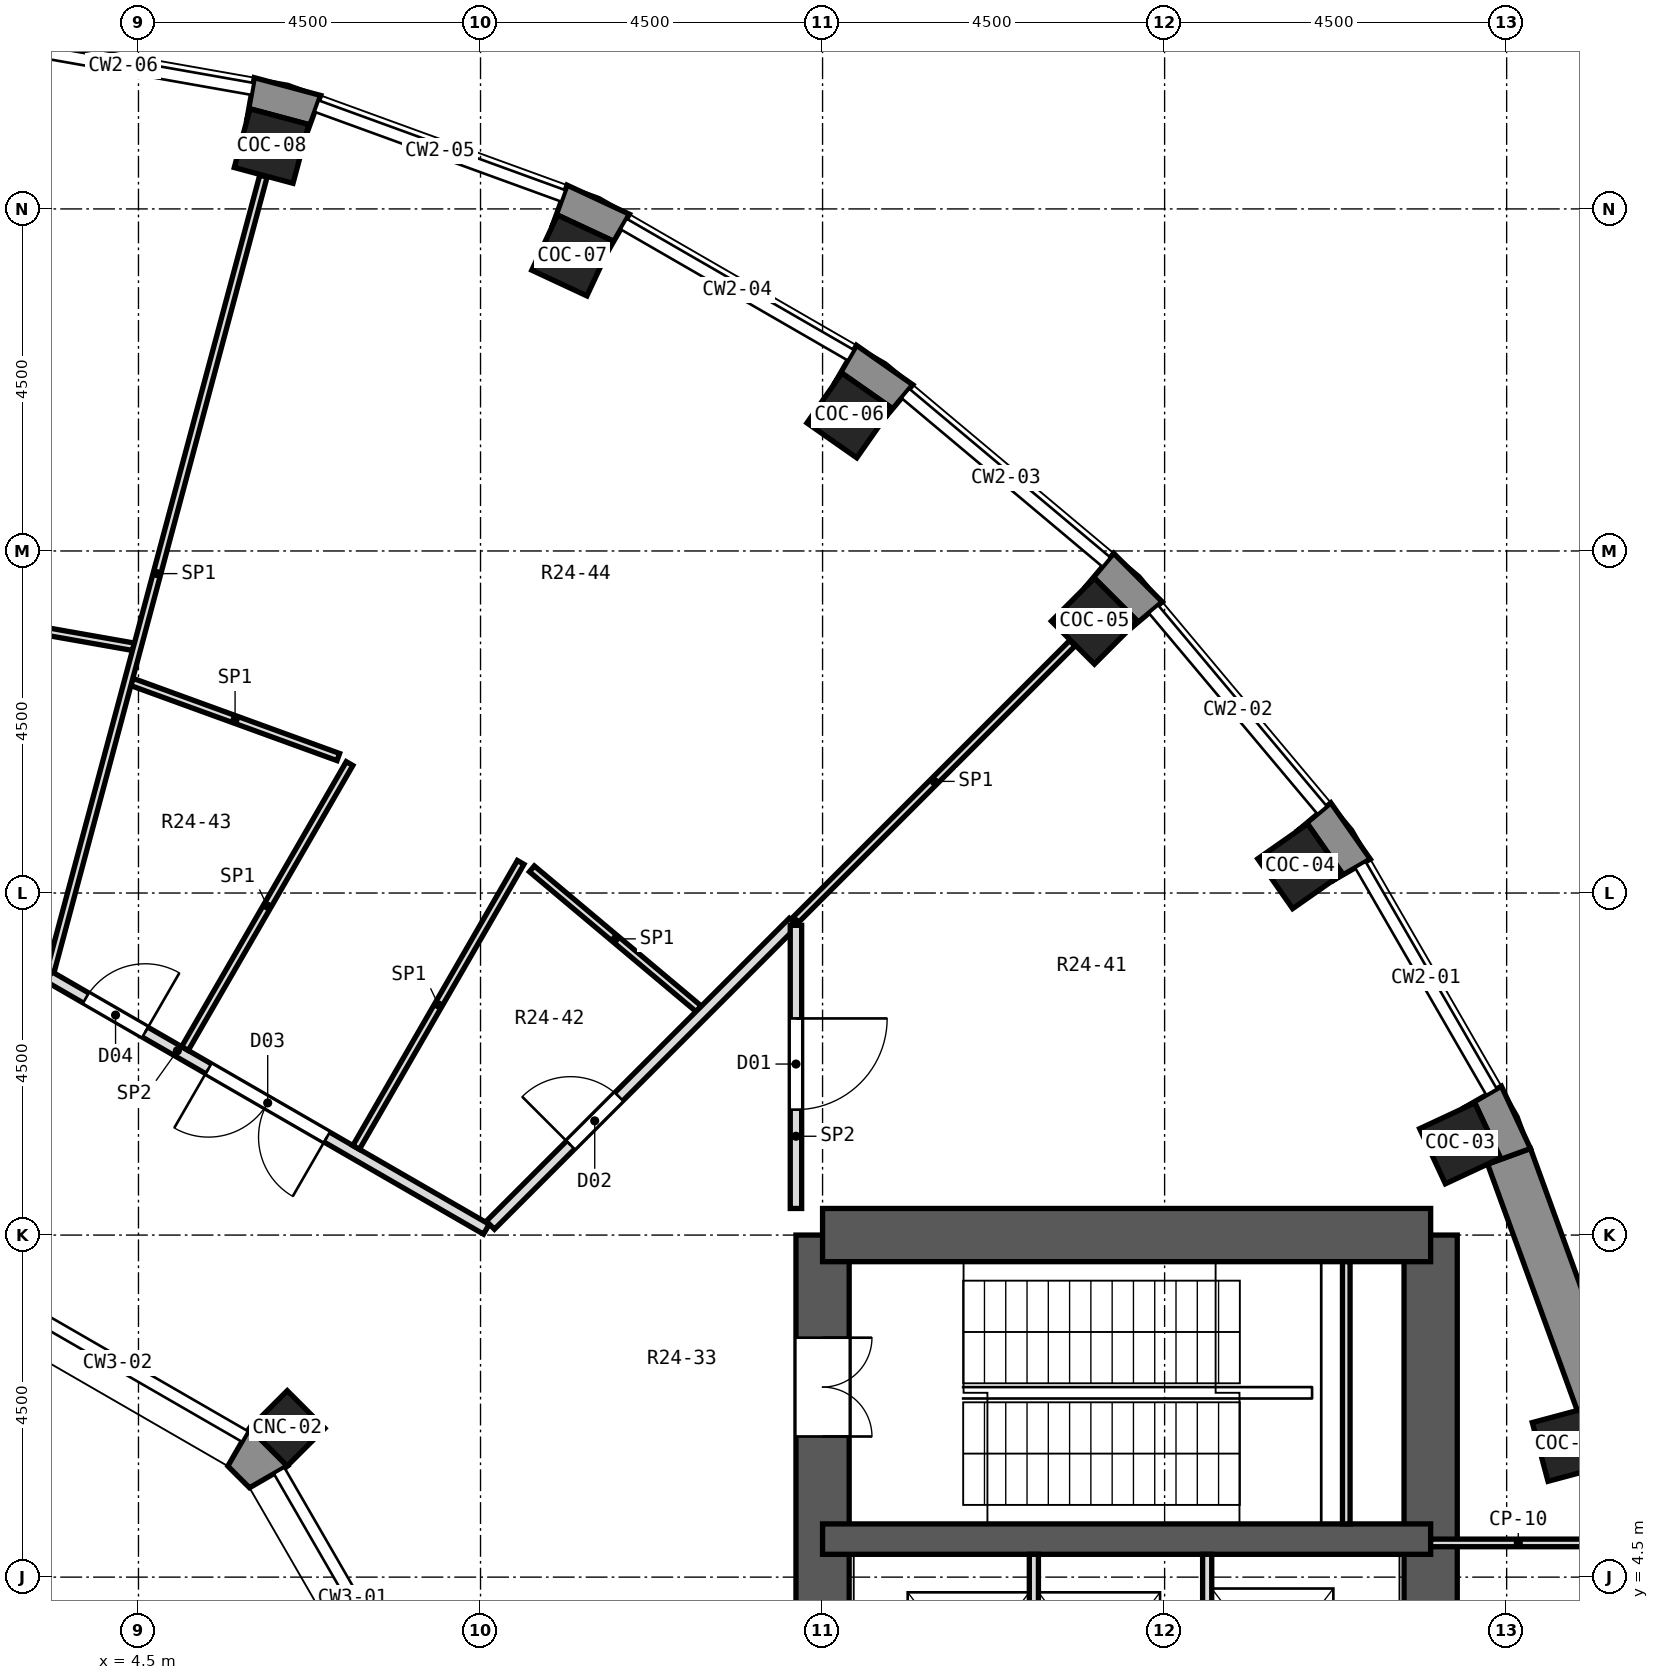
"""IFC4 building model, lengths in metres.
Left out: names, types, materials, properties, quantities, classifications, styles, units other than length and angle.
Written with IfcOpenShell. Run it as: python <this file> out.ifc"""

import sys

from ifc_helpers import new_model, si_unit, direction, frame, frame_2d, origin, origin_2d, place, context, subcontext, project, spatial, polyline, rectangle, outline, extrude, element, fill, save


model = new_model("IFC4")
c1 = context("Model", 3, precision=1e-05, world=origin(), true_north=direction((0.0, 1.0)))
c2 = subcontext(c1, "Body", "Model", "MODEL_VIEW")
j1 = project(units=[si_unit("LENGTHUNIT", "METRE"), si_unit("PLANEANGLEUNIT", "RADIAN")], contexts=[c1])
p1 = place(None, origin())
s1 = spatial("IfcSite", under=j1, at=p1, CompositionType="ELEMENT")
p2 = place(p1, origin())
s2 = spatial("IfcBuilding", under=s1, at=p2, CompositionType="ELEMENT")
p3 = place(p2, frame((0.0, 0.0, 155.8)))
s3 = spatial("IfcBuildingStorey", under=s2, at=p3, CompositionType="ELEMENT", Elevation=155.8)
for number, where, z_axis, x_axis in (
    (1, (23.327, 6.25, -0.55), (0.0, 0.0, 1.0), (0.966, 0.259, 0.0)),
    (2, (21.887, 10.206, -0.55), (0.0, 0.0, 1.0), (0.906, 0.423, 0.0)),
    (3, (19.782, 13.852, -0.55), (0.0, 0.0, 1.0), (0.819, 0.574, 0.0)),
    (4, (17.077, 17.077, -0.55), (0.0, 0.0, 1.0), (0.707, 0.707, 0.0)),
    (5, (13.852, 19.782, -0.55), (0.0, 0.0, 1.0), (0.574, 0.819, 0.0)),
    (6, (10.206, 21.887, -0.55), (0.0, 0.0, 1.0), (0.423, 0.906, 0.0)),
    (7, (6.25, 23.327, -0.55), (0.0, 0.0, 1.0), (0.259, 0.966, 0.0)),
):
    element("IfcColumn", number, at=place(p3, frame(where, z_axis=z_axis, x_axis=x_axis)), inside=s3, PredefinedType="COLUMN", context=c2, shape_type="SweptSolid", body=[
        extrude(rectangle(XDim=0.8, YDim=0.8, at=origin_2d()), origin(), (0.0, 0.0, 1.0), 5.55),
    ])
p4 = place(p3, frame((6.458, 6.458, 0.0), z_axis=(0.0, 0.0, 1.0), x_axis=(0.707106781187, 0.707106781187, 0.0)))
e8 = element("IfcColumn", 8, at=p4, inside=s3, PredefinedType="COLUMN", context=c2, shape_type="SweptSolid", body=[
    extrude(rectangle(XDim=0.7, YDim=0.7, at=origin_2d()), origin(), (0.0, 0.0, 1.0), 5.0),
])
p5 = place(p3, frame((13.5, -9.0, 0.0), z_axis=(0.0, 0.0, 1.0), x_axis=(0.0, 1.0, 0.0)))
e9 = element("IfcWall", 9, at=p5, inside=s3, PredefinedType="SHEAR", context=c2, shape_type="SweptSolid", body=[
    extrude(rectangle(XDim=18.0, YDim=0.7, at=frame_2d((9.0, 0.0))), origin(), (0.0, 0.0, 1.0), 5.0),
])
p6 = place(p5, frame((15.35, 0.0, 0.0)))
e10 = element("IfcOpeningElement", 10, at=p6, cuts=e9, PredefinedType="OPENING", context=c2, shape_type="SweptSolid", body=[
    extrude(rectangle(XDim=1.3, YDim=2.1, at=frame_2d((0.65, 1.05))), frame((0.0, 0.362, 0.0), z_axis=(0.0, -1.0, 0.0), x_axis=(1.0, 0.0, 0.0)), (0.0, 0.0, 1.0), 0.724),
])
p7 = place(p5, frame((1.35, 0.0, 0.0)))
e11 = element("IfcOpeningElement", 11, at=p7, cuts=e9, PredefinedType="OPENING", context=c2, shape_type="SweptSolid", body=[
    extrude(rectangle(XDim=1.3, YDim=2.1, at=frame_2d((0.65, 1.05))), frame((0.0, 0.362, 0.0), z_axis=(0.0, -1.0, 0.0), x_axis=(1.0, 0.0, 0.0)), (0.0, 0.0, 1.0), 0.724),
])
p8 = place(p5, frame((7.5, 0.0, 0.0)))
e12 = element("IfcOpeningElement", 12, at=p8, cuts=e9, PredefinedType="OPENING", context=c2, shape_type="SweptSolid", body=[
    extrude(rectangle(XDim=3.0, YDim=2.4, at=frame_2d((1.5, 1.2))), frame((0.0, 0.362, 0.0), z_axis=(0.0, -1.0, 0.0), x_axis=(1.0, 0.0, 0.0)), (0.0, 0.0, 1.0), 0.724),
])
p9 = place(p3, frame((21.5, -9.0, 0.0), z_axis=(0.0, 0.0, 1.0), x_axis=(0.0, 1.0, 0.0)))
e13 = element("IfcWall", 13, at=p9, inside=s3, PredefinedType="SHEAR", context=c2, shape_type="SweptSolid", body=[
    extrude(rectangle(XDim=18.0, YDim=0.7, at=frame_2d((9.0, 0.0))), origin(), (0.0, 0.0, 1.0), 5.0),
])
p10 = place(p9, frame((9.45, 0.0, 0.0)))
e14 = element("IfcOpeningElement", 14, at=p10, cuts=e13, PredefinedType="OPENING", context=c2, shape_type="SweptSolid", body=[
    extrude(rectangle(XDim=0.9, YDim=2.1, at=frame_2d((0.45, 1.05))), frame((0.0, 0.362, 0.0), z_axis=(0.0, -1.0, 0.0), x_axis=(1.0, 0.0, 0.0)), (0.0, 0.0, 1.0), 0.724),
])
p11 = place(p9, frame((7.65, 0.0, 0.0)))
e15 = element("IfcOpeningElement", 15, at=p11, cuts=e13, PredefinedType="OPENING", context=c2, shape_type="SweptSolid", body=[
    extrude(rectangle(XDim=0.9, YDim=2.1, at=frame_2d((0.45, 1.05))), frame((0.0, 0.362, 0.0), z_axis=(0.0, -1.0, 0.0), x_axis=(1.0, 0.0, 0.0)), (0.0, 0.0, 1.0), 0.724),
])
p12 = place(p3, frame((13.5, 9.0, 0.0), z_axis=(0.0, 0.0, 1.0), x_axis=(1.0, 0.0, 0.0)))
e16 = element("IfcWall", 16, at=p12, inside=s3, PredefinedType="SHEAR", context=c2, shape_type="SweptSolid", body=[
    extrude(rectangle(XDim=8.0, YDim=0.7, at=frame_2d((4.0, 0.0))), origin(), (0.0, 0.0, 1.0), 5.0),
])
p13 = place(p3, frame((13.5, 5.0, 0.0), z_axis=(0.0, 0.0, 1.0), x_axis=(1.0, 0.0, 0.0)))
e17 = element("IfcWall", 17, at=p13, inside=s3, PredefinedType="SHEAR", context=c2, shape_type="SweptSolid", body=[
    extrude(rectangle(XDim=8.0, YDim=0.4, at=frame_2d((4.0, 0.0))), origin(), (0.0, 0.0, 1.0), 5.0),
])
p14 = place(p3, frame((23.711, 6.794, 0.0), z_axis=(0.0, 0.0, 1.0), x_axis=(-0.342032843455, 0.93968799822, 0.0)))
e18 = element("IfcWall", 18, at=p14, inside=s3, PredefinedType="SOLIDWALL", context=c2, shape_type="SweptSolid", body=[
    extrude(rectangle(XDim=3.45, YDim=0.6, at=frame_2d((1.725, 0.0))), origin(), (0.0, 0.0, 1.0), 4.55),
])
p15 = place(p3, origin())
e19 = element("IfcWall", 19, at=p15, inside=s3, PredefinedType="SOLIDWALL", context=c2, shape_type="SweptSolid", body=[
    extrude(outline(polyline([(24.227, 6.023), (23.993, 6.897), (23.429, 6.692), (23.61, 6.74), (23.817, 5.968), (23.636, 5.919), (24.227, 6.023)])), origin(), (0.0, 0.0, 1.0), 4.55),
])
p16 = place(p3, origin())
e20 = element("IfcWall", 20, at=p16, inside=s3, PredefinedType="SOLIDWALL", context=c2, shape_type="SweptSolid", body=[
    extrude(outline(polyline([(22.431, 10.959), (21.911, 10.659), (22.081, 10.738), (22.419, 10.013), (22.249, 9.934), (22.813, 10.139), (22.431, 10.959)])), origin(), (0.0, 0.0, 1.0), 4.55),
])
p17 = place(p3, origin())
e21 = element("IfcWall", 21, at=p17, inside=s3, PredefinedType="SOLIDWALL", context=c2, shape_type="SweptSolid", body=[
    extrude(outline(polyline([(20.706, 13.946), (20.187, 14.687), (19.727, 14.302), (19.881, 14.409), (20.34, 13.754), (20.186, 13.646), (20.706, 13.946)])), origin(), (0.0, 0.0, 1.0), 4.55),
])
p18 = place(p3, origin())
e22 = element("IfcWall", 22, at=p18, inside=s3, PredefinedType="SOLIDWALL", context=c2, shape_type="SweptSolid", body=[
    extrude(outline(polyline([(17.33, 17.969), (16.944, 17.51), (17.077, 17.642), (17.642, 17.077), (17.51, 16.944), (17.969, 17.33), (17.33, 17.969)])), origin(), (0.0, 0.0, 1.0), 4.55),
])
p19 = place(p3, origin())
e23 = element("IfcWall", 23, at=p19, inside=s3, PredefinedType="SOLIDWALL", context=c2, shape_type="SweptSolid", body=[
    extrude(outline(polyline([(14.687, 20.187), (13.946, 20.706), (13.646, 20.186), (13.754, 20.34), (14.409, 19.881), (14.302, 19.727), (14.687, 20.187)])), origin(), (0.0, 0.0, 1.0), 4.55),
])
p20 = place(p3, origin())
e24 = element("IfcWall", 24, at=p20, inside=s3, PredefinedType="SOLIDWALL", context=c2, shape_type="SweptSolid", body=[
    extrude(outline(polyline([(10.139, 22.813), (9.934, 22.249), (10.013, 22.419), (10.738, 22.081), (10.659, 21.911), (10.959, 22.431), (10.139, 22.813)])), origin(), (0.0, 0.0, 1.0), 4.55),
])
p21 = place(p3, origin())
e25 = element("IfcWall", 25, at=p21, inside=s3, PredefinedType="SOLIDWALL", context=c2, shape_type="SweptSolid", body=[
    extrude(outline(polyline([(6.023, 24.227), (5.919, 23.636), (5.968, 23.817), (6.74, 23.61), (6.692, 23.429), (6.897, 23.993), (6.023, 24.227)])), origin(), (0.0, 0.0, 1.0), 4.55),
])
p22 = place(p3, origin())
e26 = element("IfcWall", 26, at=p22, inside=s3, PredefinedType="SOLIDWALL", context=c2, shape_type="SweptSolid", body=[
    extrude(outline(polyline([(5.962, 6.458), (5.676, 5.961), (5.961, 5.676), (6.458, 5.962), (5.962, 6.458)])), origin(), (0.0, 0.0, 1.0), 4.55),
])
p23 = place(p3, frame((9.676, 13.818, 0.0), z_axis=(0.0, 0.0, 1.0), x_axis=(0.765988490515, -0.64285428551, 0.0)))
e27 = element("IfcWall", 27, at=p23, inside=s3, PredefinedType="PARTITIONING", context=c2, shape_type="SweptSolid", body=[
    extrude(rectangle(XDim=2.865, YDim=0.1, at=frame_2d((1.433, 0.0))), origin(), (0.0, 0.0, 1.0), 4.55),
])
p24 = place(p3, frame((3.323, 12.4, 0.0), z_axis=(0.0, 0.0, 1.0), x_axis=(0.865961614908, -0.500110469302, 0.0)))
e28 = element("IfcWall", 28, at=p24, inside=s3, PredefinedType="PARTITIONING", context=c2, shape_type="SweptSolid", body=[
    extrude(rectangle(XDim=6.645, YDim=0.15, at=frame_2d((3.322, 0.0))), origin(), (0.0, 0.0, 1.0), 4.55),
])
p25 = place(p24, frame((2.422, 0.0, 0.0)))
e29 = element("IfcOpeningElement", 29, at=p25, cuts=e28, PredefinedType="OPENING", context=c2, shape_type="SweptSolid", body=[
    extrude(rectangle(XDim=1.8, YDim=2.1, at=frame_2d((0.9, 1.05))), frame((0.0, 0.087, 0.0), z_axis=(0.0, -1.0, 0.0), x_axis=(1.0, 0.0, 0.0)), (0.0, 0.0, 1.0), 0.174),
])
p26 = place(p24, frame((0.561, 0.0, 0.0)))
e30 = element("IfcOpeningElement", 30, at=p26, cuts=e28, PredefinedType="OPENING", context=c2, shape_type="SweptSolid", body=[
    extrude(rectangle(XDim=0.9, YDim=2.1, at=frame_2d((0.45, 1.05))), frame((0.0, 0.087, 0.0), z_axis=(0.0, -1.0, 0.0), x_axis=(1.0, 0.0, 0.0)), (0.0, 0.0, 1.0), 0.174),
])
p27 = place(p3, frame((4.413, 16.277, 0.0), z_axis=(0.0, 0.0, 1.0), x_axis=(0.939768755, -0.341810893809, 0.0)))
e31 = element("IfcWall", 31, at=p27, inside=s3, PredefinedType="PARTITIONING", context=c2, shape_type="SweptSolid", body=[
    extrude(rectangle(XDim=2.89, YDim=0.1, at=frame_2d((1.445, 0.0))), origin(), (0.0, 0.0, 1.0), 4.55),
])
p28 = place(p3, frame((1.51, 17.255, 0.0), z_axis=(0.0, 0.0, 1.0), x_axis=(0.984831536916, -0.173513238385, 0.0)))
e32 = element("IfcWall", 32, at=p28, inside=s3, PredefinedType="PARTITIONING", context=c2, shape_type="SweptSolid", body=[
    extrude(rectangle(XDim=2.969, YDim=0.1, at=frame_2d((1.484, 0.0))), origin(), (0.0, 0.0, 1.0), 4.55),
])
p29 = place(p3, frame((13.15, 13.15, 0.0), z_axis=(0.0, 0.0, 1.0), x_axis=(0.707106781187, 0.707106781187, 0.0)))
e33 = element("IfcWall", 33, at=p29, inside=s3, PredefinedType="PARTITIONING", context=c2, shape_type="SweptSolid", body=[
    extrude(rectangle(XDim=5.143, YDim=0.1, at=frame_2d((2.572, 0.0))), origin(), (0.0, 0.0, 1.0), 4.55),
])
p30 = place(p3, frame((9.13, 9.13, 0.0), z_axis=(0.0, 0.0, 1.0), x_axis=(0.707106781187, 0.707106781187, 0.0)))
e34 = element("IfcWall", 34, at=p30, inside=s3, PredefinedType="PARTITIONING", context=c2, shape_type="SweptSolid", body=[
    extrude(rectangle(XDim=5.635, YDim=0.15, at=frame_2d((2.817, 0.0))), origin(), (0.0, 0.0, 1.0), 4.55),
])
p31 = place(p30, frame((1.491, 0.0, 0.0)))
e35 = element("IfcOpeningElement", 35, at=p31, cuts=e34, PredefinedType="OPENING", context=c2, shape_type="SweptSolid", body=[
    extrude(rectangle(XDim=0.9, YDim=2.1, at=frame_2d((0.45, 1.05))), frame((0.0, 0.087, 0.0), z_axis=(0.0, -1.0, 0.0), x_axis=(1.0, 0.0, 0.0)), (0.0, 0.0, 1.0), 0.174),
])
p32 = place(p3, frame((7.364, 10.153, 0.0), z_axis=(0.0, 0.0, 1.0), x_axis=(0.499911184982, 0.866076675087, 0.0)))
e36 = element("IfcWall", 36, at=p32, inside=s3, PredefinedType="PARTITIONING", context=c2, shape_type="SweptSolid", body=[
    extrude(rectangle(XDim=4.33, YDim=0.1, at=frame_2d((2.165, 0.0))), origin(), (0.0, 0.0, 1.0), 4.55),
])
p33 = place(p3, frame((5.112, 11.454, 0.0), z_axis=(0.0, 0.0, 1.0), x_axis=(0.500178009373, 0.865922605629, 0.0)))
e37 = element("IfcWall", 37, at=p33, inside=s3, PredefinedType="PARTITIONING", context=c2, shape_type="SweptSolid", body=[
    extrude(rectangle(XDim=4.33, YDim=0.1, at=frame_2d((2.165, 0.0))), origin(), (0.0, 0.0, 1.0), 4.55),
])
p34 = place(p3, frame((3.342, 12.472, 0.0), z_axis=(0.0, 0.0, 1.0), x_axis=(0.258741720617, 0.965946542005, 0.0)))
e38 = element("IfcWall", 38, at=p34, inside=s3, PredefinedType="PARTITIONING", context=c2, shape_type="SweptSolid", body=[
    extrude(rectangle(XDim=10.827, YDim=0.1, at=frame_2d((5.414, 0.0))), origin(), (0.0, 0.0, 1.0), 4.55),
])
p35 = place(p3, frame((13.15, 9.35, 0.0), z_axis=(0.0, 0.0, 1.0), x_axis=(0.0, 1.0, 0.0)))
e39 = element("IfcWall", 39, at=p35, inside=s3, PredefinedType="PARTITIONING", context=c2, shape_type="SweptSolid", body=[
    extrude(rectangle(XDim=3.725, YDim=0.15, at=frame_2d((1.862, 0.0))), origin(), (0.0, 0.0, 1.0), 4.55),
])
p36 = place(p35, frame((1.3, 0.0, 0.0)))
e40 = element("IfcOpeningElement", 40, at=p36, cuts=e39, PredefinedType="OPENING", context=c2, shape_type="SweptSolid", body=[
    extrude(rectangle(XDim=1.2, YDim=2.1, at=frame_2d((0.6, 1.05))), frame((0.0, 0.087, 0.0), z_axis=(0.0, -1.0, 0.0), x_axis=(1.0, 0.0, 0.0)), (0.0, 0.0, 1.0), 0.174),
])
p37 = place(p3, frame((21.5, 4.95, 0.0), z_axis=(0.0, 0.0, 1.0), x_axis=(1.0, 0.0, 0.0)))
e41 = element("IfcWall", 41, at=p37, inside=s3, PredefinedType="PARTITIONING", context=c2, shape_type="SweptSolid", body=[
    extrude(rectangle(XDim=2.307, YDim=0.1, at=frame_2d((1.153, 0.0))), origin(), (0.0, 0.0, 1.0), 4.55),
])
for number, where, z_axis, x_axis in (
    (42, (16.28, 2.2, 0.0), (0.0, 0.0, 1.0), (0.0, 1.0, 0.0)),
    (43, (18.56, 2.2, 0.0), (0.0, 0.0, 1.0), (0.0, 1.0, 0.0)),
):
    element("IfcWall", number, at=place(p3, frame(where, z_axis=z_axis, x_axis=x_axis)), inside=s3, PredefinedType="PARTITIONING", context=c2, shape_type="SweptSolid", body=[
        extrude(rectangle(XDim=2.6, YDim=0.12, at=frame_2d((1.3, 0.0))), origin(), (0.0, 0.0, 1.0), 4.55),
    ])
p38 = place(p3, frame((20.39, 5.2, 0.0), z_axis=(0.0, 0.0, 1.0), x_axis=(0.0, 1.0, 0.0)))
e44 = element("IfcWall", 44, at=p38, inside=s3, PredefinedType="PARTITIONING", context=c2, shape_type="SweptSolid", body=[
    extrude(rectangle(XDim=3.45, YDim=0.1, at=frame_2d((1.725, 0.0))), origin(), (0.0, 0.0, 1.0), 4.55),
])
p39 = place(p36, frame((1.2, 0.0, 0.0), z_axis=(0.0, 0.0, 1.0), x_axis=(-1.0, 0.0, 0.0)))
e45 = element("IfcDoor", 45, at=p39, inside=s3, OperationType="SINGLE_SWING_LEFT", PredefinedType="DOOR", context=c2, shape_type="SweptSolid", body=[
    extrude(rectangle(XDim=1.2, YDim=2.1, at=frame_2d((0.6, 1.05))), frame((0.0, 0.025, 0.0), z_axis=(0.0, -1.0, 0.0), x_axis=(1.0, 0.0, 0.0)), (0.0, 0.0, 1.0), 0.05),
])
fill(e40, e45)
p40 = place(p31, origin())
e46 = element("IfcDoor", 46, at=p40, inside=s3, OperationType="SINGLE_SWING_LEFT", PredefinedType="DOOR", context=c2, shape_type="SweptSolid", body=[
    extrude(rectangle(XDim=0.9, YDim=2.1, at=frame_2d((0.45, 1.05))), frame((0.0, 0.025, 0.0), z_axis=(0.0, -1.0, 0.0), x_axis=(1.0, 0.0, 0.0)), (0.0, 0.0, 1.0), 0.05),
])
fill(e35, e46)
p41 = place(p25, frame((1.8, 0.0, 0.0), z_axis=(0.0, 0.0, 1.0), x_axis=(-1.0, 0.0, 0.0)))
e47 = element("IfcDoor", 47, at=p41, inside=s3, OperationType="DOUBLE_DOOR_SINGLE_SWING", PredefinedType="DOOR", context=c2, shape_type="SweptSolid", body=[
    extrude(rectangle(XDim=1.8, YDim=2.1, at=frame_2d((0.9, 1.05))), frame((0.0, 0.025, 0.0), z_axis=(0.0, -1.0, 0.0), x_axis=(1.0, 0.0, 0.0)), (0.0, 0.0, 1.0), 0.05),
])
fill(e29, e47)
p42 = place(p26, origin())
e48 = element("IfcDoor", 48, at=p42, inside=s3, OperationType="SINGLE_SWING_RIGHT", PredefinedType="DOOR", context=c2, shape_type="SweptSolid", body=[
    extrude(rectangle(XDim=0.9, YDim=2.1, at=frame_2d((0.45, 1.05))), frame((0.0, 0.025, 0.0), z_axis=(0.0, -1.0, 0.0), x_axis=(1.0, 0.0, 0.0)), (0.0, 0.0, 1.0), 0.05),
])
fill(e30, e48)
p43 = place(p6, frame((1.3, 0.0, 0.0), z_axis=(0.0, 0.0, 1.0), x_axis=(-1.0, 0.0, 0.0)))
e49 = element("IfcDoor", 49, at=p43, inside=s3, OperationType="DOUBLE_DOOR_SINGLE_SWING", PredefinedType="DOOR", context=c2, shape_type="SweptSolid", body=[
    extrude(rectangle(XDim=1.3, YDim=2.1, at=frame_2d((0.65, 1.05))), frame((0.0, 0.025, 0.0), z_axis=(0.0, -1.0, 0.0), x_axis=(1.0, 0.0, 0.0)), (0.0, 0.0, 1.0), 0.05),
])
fill(e10, e49)
save(model, sys.argv[1])
